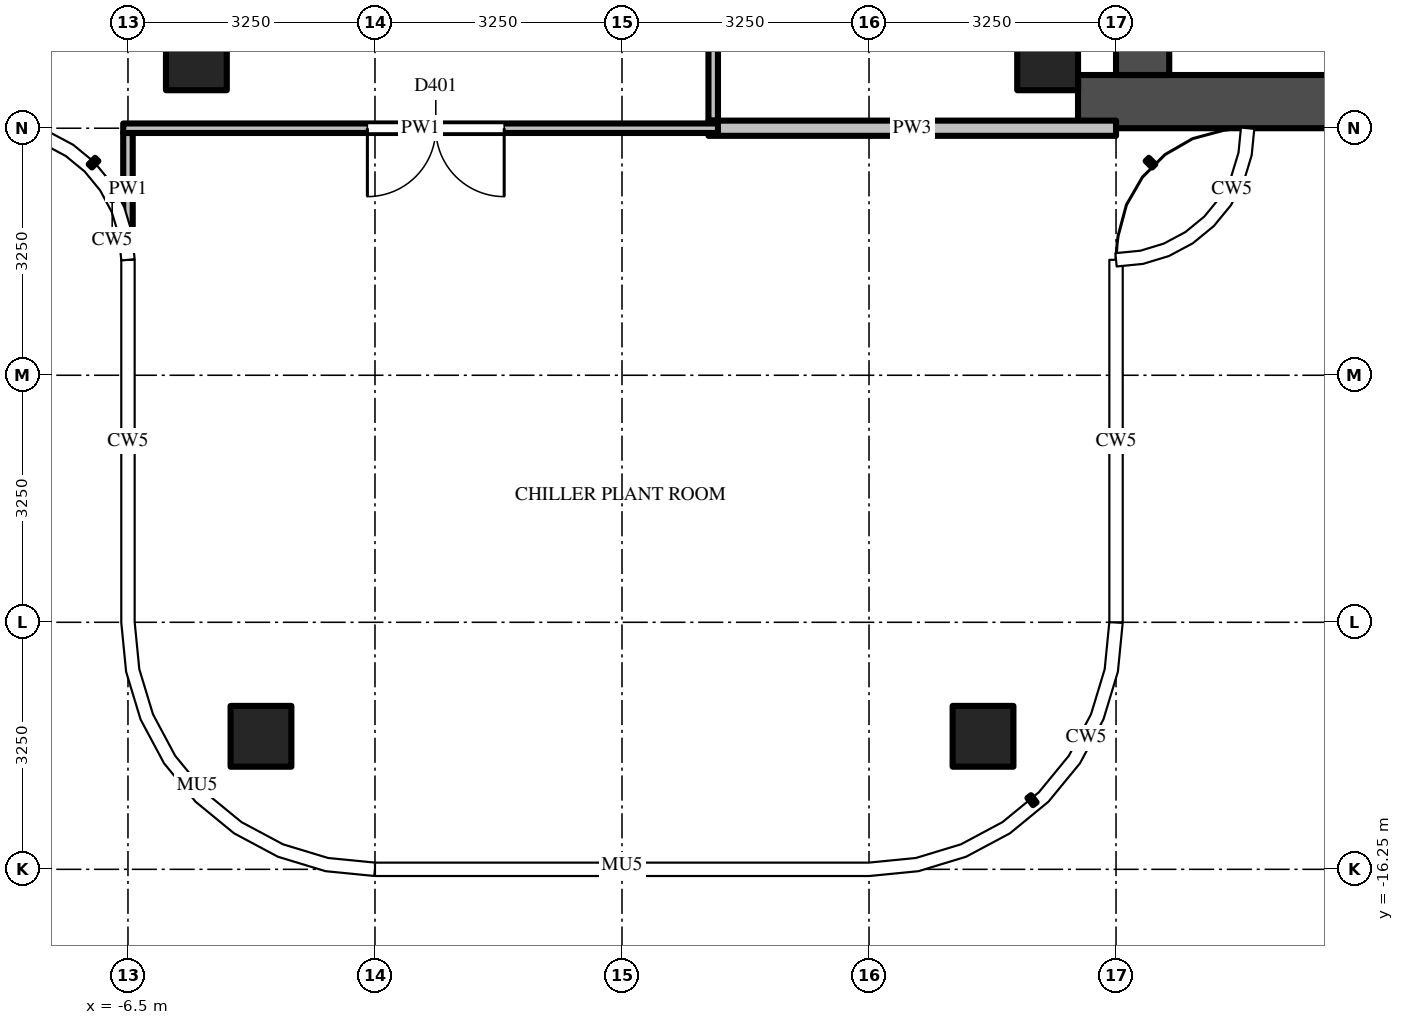
"""IFC4 building model, lengths in metres.
Left out: names, types, materials, properties, quantities, classifications, styles, units other than length and angle.
Written with IfcOpenShell. Run it as: python <this file> out.ifc"""

import sys

from ifc_helpers import new_model, si_unit, direction, frame, frame_2d, origin, origin_2d, place, context, subcontext, project, spatial, rectangle, extrude, source, transform, mapped, element, fill, save


model = new_model("IFC4")
c1 = context("Model", 3, precision=1e-05, world=origin(), true_north=direction((0.0, 1.0)))
c2 = subcontext(c1, "Body", "Model", "MODEL_VIEW")
j1 = project(units=[si_unit("LENGTHUNIT", "METRE"), si_unit("PLANEANGLEUNIT", "RADIAN")], contexts=[c1])
p1 = place(None, origin())
s1 = spatial("IfcSite", under=j1, at=p1, CompositionType="ELEMENT")
p2 = place(p1, origin())
s2 = spatial("IfcBuilding", under=s1, at=p2, CompositionType="ELEMENT")
p3 = place(p2, frame((0.0, 0.0, 350.1)))
s3 = spatial("IfcBuildingStorey", under=s2, at=p3, CompositionType="ELEMENT", Elevation=350.1)
m1 = source(origin(), c2, "Body", "SweptSolid", [
    extrude(rectangle(XDim=0.8, YDim=0.8, at=origin_2d()), origin(), (0.0, 0.0, 1.0), 4.0),
])
for number, where, z_axis, x_axis in (
    (1, (5.6, -5.6, 0.0), (0.0, 0.0, 1.0), (1.0, 0.0, 0.0)),
    (2, (-5.6, -5.6, 0.0), (0.0, 0.0, 1.0), (1.0, 0.0, 0.0)),
    (3, (4.75, -14.5, 0.0), (0.0, 0.0, 1.0), (1.0, 0.0, 0.0)),
    (4, (-4.75, -14.5, 0.0), (0.0, 0.0, 1.0), (1.0, 0.0, 0.0)),
):
    element("IfcColumn", number, at=place(p3, frame(where, z_axis=z_axis, x_axis=x_axis)), inside=s3, PredefinedType="COLUMN", context=c2, shape_type="MappedRepresentation", body=[
        mapped(m1, transform((0.0, 0.0, 0.0))),
    ])
m2 = source(origin(), c2, "Body", "SweptSolid", [
    extrude(rectangle(XDim=16.75, YDim=0.7, at=frame_2d((8.375, 0.0))), origin(), (0.0, 0.0, 1.0), 3.75),
])
p4 = place(p3, frame((6.0, -6.15, 0.0), z_axis=(0.0, 0.0, 1.0), x_axis=(1.0, 0.0, 0.0)))
e5 = element("IfcWall", 5, at=p4, inside=s3, PredefinedType="SHEAR", context=c2, shape_type="MappedRepresentation", body=[
    mapped(m2, transform((0.0, 0.0, 0.0))),
])
m3 = source(origin(), c2, "Body", "SweptSolid", [
    extrude(rectangle(XDim=9.05, YDim=0.7, at=frame_2d((4.525, 0.0))), origin(), (0.0, 0.0, 1.0), 3.75),
])
p5 = place(p3, frame((6.85, -5.8, 0.0), z_axis=(0.0, 0.0, 1.0), x_axis=(0.0, 1.0, 0.0)))
e6 = element("IfcWall", 6, at=p5, inside=s3, PredefinedType="SHEAR", context=c2, shape_type="MappedRepresentation", body=[
    mapped(m3, transform((0.0, 0.0, 0.0))),
])
m4 = source(origin(), c2, "Body", "SweptSolid", [
    extrude(rectangle(XDim=1.8, YDim=2.1, at=frame_2d((0.9, 1.05))), frame((0.0, 0.36, 0.0), z_axis=(0.0, -1.0, 0.0), x_axis=(1.0, 0.0, 0.0)), (0.0, 0.0, 1.0), 0.72),
])
p6 = place(p5, frame((3.15, 0.0, 0.0)))
e7 = element("IfcOpeningElement", 7, at=p6, cuts=e6, PredefinedType="OPENING", context=c2, shape_type="MappedRepresentation", body=[
    mapped(m4, transform((0.0, 0.0, 0.0))),
])
m5 = source(origin(), c2, "Body", "SweptSolid", [
    extrude(rectangle(XDim=1.469, YDim=0.125, at=frame_2d((0.734, 0.0))), origin(), (0.0, 0.0, 1.0), 3.75),
])
p7 = place(p3, frame((-6.5, -6.562, 0.0), z_axis=(0.0, 0.0, 1.0), x_axis=(0.0, -1.0, 0.0)))
e8 = element("IfcWall", 8, at=p7, inside=s3, PredefinedType="PARTITIONING", context=c2, shape_type="MappedRepresentation", body=[
    mapped(m5, transform((0.0, 0.0, 0.0))),
])
m6 = source(origin(), c2, "Body", "SweptSolid", [
    extrude(rectangle(XDim=3.087, YDim=0.125, at=frame_2d((1.544, 0.0))), origin(), (0.0, 0.0, 1.0), 3.046),
])
p8 = place(p3, frame((1.2, -3.312, 0.0), z_axis=(0.0, 0.0, 1.0), x_axis=(0.0, -1.0, 0.0)))
e9 = element("IfcWall", 9, at=p8, inside=s3, PredefinedType="PARTITIONING", context=c2, shape_type="MappedRepresentation", body=[
    mapped(m6, transform((0.0, 0.0, 0.0))),
])
m7 = source(origin(), c2, "Body", "SweptSolid", [
    extrude(rectangle(XDim=5.363, YDim=0.2, at=frame_2d((2.681, 0.0))), origin(), (0.0, 0.0, 1.0), 3.75),
])
p9 = place(p3, frame((1.137, -6.5, 0.0), z_axis=(0.0, 0.0, 1.0), x_axis=(1.0, 0.0, 0.0)))
e10 = element("IfcWall", 10, at=p9, inside=s3, PredefinedType="PARTITIONING", context=c2, shape_type="MappedRepresentation", body=[
    mapped(m7, transform((0.0, 0.0, 0.0))),
])
m8 = source(origin(), c2, "Body", "SweptSolid", [
    extrude(rectangle(XDim=7.825, YDim=0.125, at=frame_2d((3.913, 0.0))), origin(), (0.0, 0.0, 1.0), 3.75),
])
p10 = place(p3, frame((1.262, -6.5, 0.0), z_axis=(0.0, 0.0, 1.0), x_axis=(-1.0, 0.0, 0.0)))
e11 = element("IfcWall", 11, at=p10, inside=s3, PredefinedType="PARTITIONING", context=c2, shape_type="MappedRepresentation", body=[
    mapped(m8, transform((0.0, 0.0, 0.0))),
])
m9 = source(origin(), c2, "Body", "SweptSolid", [
    extrude(rectangle(XDim=1.8, YDim=2.1, at=frame_2d((0.9, 1.05))), frame((0.0, 0.073, 0.0), z_axis=(0.0, -1.0, 0.0), x_axis=(1.0, 0.0, 0.0)), (0.0, 0.0, 1.0), 0.145),
])
p11 = place(p10, frame((2.812, 0.0, 0.0)))
e12 = element("IfcOpeningElement", 12, at=p11, cuts=e11, PredefinedType="OPENING", context=c2, shape_type="MappedRepresentation", body=[
    mapped(m9, transform((0.0, 0.0, 0.0))),
])
m10 = source(origin(), c2, "Body", "SweptSolid", [
    extrude(rectangle(XDim=1.8, YDim=2.1, at=frame_2d((0.9, 1.05))), frame((0.0, 0.025, 0.0), z_axis=(0.0, -1.0, 0.0), x_axis=(1.0, 0.0, 0.0)), (0.0, 0.0, 1.0), 0.05),
])
p12 = place(p11, origin())
e13 = element("IfcDoor", 13, at=p12, inside=s3, OperationType="DOUBLE_DOOR_SINGLE_SWING", PredefinedType="DOOR", context=c2, shape_type="MappedRepresentation", body=[
    mapped(m10, transform((0.0, 0.0, 0.0))),
])
fill(e12, e13)
save(model, sys.argv[1])
